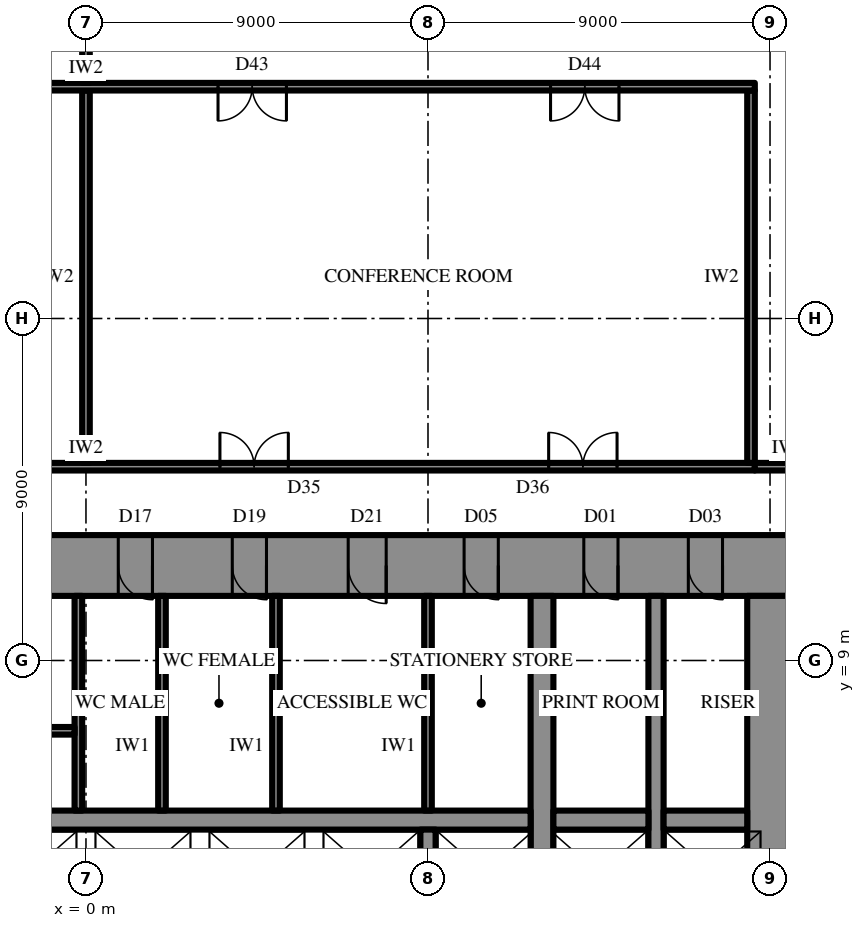
"""IFC4 building model, lengths in metres.
Left out: names, types, materials, properties, quantities, classifications, styles, units other than length and angle.
Written with IfcOpenShell. Run it as: python <this file> out.ifc"""

import sys

from ifc_helpers import new_model, si_unit, direction, frame, frame_2d, origin, place, context, subcontext, project, spatial, rectangle, extrude, element, fill, save


model = new_model("IFC4")
c1 = context("Model", 3, precision=1e-05, world=origin(), true_north=direction((0.0, 1.0)))
c2 = subcontext(c1, "Body", "Model", "MODEL_VIEW")
j1 = project(units=[si_unit("LENGTHUNIT", "METRE"), si_unit("PLANEANGLEUNIT", "RADIAN")], contexts=[c1])
p1 = place(None, origin())
s1 = spatial("IfcSite", under=j1, at=p1, CompositionType="ELEMENT")
p2 = place(p1, origin())
s2 = spatial("IfcBuilding", under=s1, at=p2, CompositionType="ELEMENT")
p3 = place(p2, frame((0.0, 0.0, 13.0)))
s3 = spatial("IfcBuildingStorey", under=s2, at=p3, CompositionType="ELEMENT", Elevation=13.0)
p4 = place(p3, frame((-18.6, 11.5, 0.0), z_axis=(0.0, 0.0, 1.0), x_axis=(1.0, 0.0, 0.0)))
e1 = element("IfcWall", 1, at=p4, inside=s3, PredefinedType="SHEAR", context=c2, shape_type="SweptSolid", body=[
    extrude(rectangle(XDim=37.2, YDim=1.6, at=frame_2d((18.6, 0.0))), origin(), (0.0, 0.0, 1.0), 5.5),
])
p5 = place(p4, frame((19.45, 0.0, 0.0)))
e2 = element("IfcOpeningElement", 2, at=p5, cuts=e1, PredefinedType="OPENING", context=c2, shape_type="SweptSolid", body=[
    extrude(rectangle(XDim=0.9, YDim=2.2, at=frame_2d((0.45, 1.1))), frame((0.0, 0.81, 0.0), z_axis=(0.0, -1.0, 0.0), x_axis=(1.0, 0.0, 0.0)), (0.0, 0.0, 1.0), 1.62),
])
p6 = place(p4, frame((22.45, 0.0, 0.0)))
e3 = element("IfcOpeningElement", 3, at=p6, cuts=e1, PredefinedType="OPENING", context=c2, shape_type="SweptSolid", body=[
    extrude(rectangle(XDim=0.9, YDim=2.2, at=frame_2d((0.45, 1.1))), frame((0.0, 0.81, 0.0), z_axis=(0.0, -1.0, 0.0), x_axis=(1.0, 0.0, 0.0)), (0.0, 0.0, 1.0), 1.62),
])
p7 = place(p4, frame((25.5, 0.0, 0.0)))
e4 = element("IfcOpeningElement", 4, at=p7, cuts=e1, PredefinedType="OPENING", context=c2, shape_type="SweptSolid", body=[
    extrude(rectangle(XDim=1.0, YDim=2.2, at=frame_2d((0.5, 1.1))), frame((0.0, 0.81, 0.0), z_axis=(0.0, -1.0, 0.0), x_axis=(1.0, 0.0, 0.0)), (0.0, 0.0, 1.0), 1.62),
])
p8 = place(p4, frame((1.85, 0.0, 0.0)))
e5 = element("IfcOpeningElement", 5, at=p8, cuts=e1, PredefinedType="OPENING", context=c2, shape_type="SweptSolid", body=[
    extrude(rectangle(XDim=0.9, YDim=2.2, at=frame_2d((0.45, 1.1))), frame((0.0, 0.81, 0.0), z_axis=(0.0, -1.0, 0.0), x_axis=(1.0, 0.0, 0.0)), (0.0, 0.0, 1.0), 1.62),
])
p9 = place(p4, frame((4.6, 0.0, 0.0)))
e6 = element("IfcOpeningElement", 6, at=p9, cuts=e1, PredefinedType="OPENING", context=c2, shape_type="SweptSolid", body=[
    extrude(rectangle(XDim=0.9, YDim=2.2, at=frame_2d((0.45, 1.1))), frame((0.0, 0.81, 0.0), z_axis=(0.0, -1.0, 0.0), x_axis=(1.0, 0.0, 0.0)), (0.0, 0.0, 1.0), 1.62),
])
p10 = place(p4, frame((7.75, 0.0, 0.0)))
e7 = element("IfcOpeningElement", 7, at=p10, cuts=e1, PredefinedType="OPENING", context=c2, shape_type="SweptSolid", body=[
    extrude(rectangle(XDim=0.9, YDim=2.2, at=frame_2d((0.45, 1.1))), frame((0.0, 0.81, 0.0), z_axis=(0.0, -1.0, 0.0), x_axis=(1.0, 0.0, 0.0)), (0.0, 0.0, 1.0), 1.62),
])
p11 = place(p4, frame((28.55, 0.0, 0.0)))
e8 = element("IfcOpeningElement", 8, at=p11, cuts=e1, PredefinedType="OPENING", context=c2, shape_type="SweptSolid", body=[
    extrude(rectangle(XDim=0.9, YDim=2.2, at=frame_2d((0.45, 1.1))), frame((0.0, 0.81, 0.0), z_axis=(0.0, -1.0, 0.0), x_axis=(1.0, 0.0, 0.0)), (0.0, 0.0, 1.0), 1.62),
])
p12 = place(p4, frame((31.7, 0.0, 0.0)))
e9 = element("IfcOpeningElement", 9, at=p12, cuts=e1, PredefinedType="OPENING", context=c2, shape_type="SweptSolid", body=[
    extrude(rectangle(XDim=0.9, YDim=2.2, at=frame_2d((0.45, 1.1))), frame((0.0, 0.81, 0.0), z_axis=(0.0, -1.0, 0.0), x_axis=(1.0, 0.0, 0.0)), (0.0, 0.0, 1.0), 1.62),
])
p13 = place(p4, frame((34.45, 0.0, 0.0)))
e10 = element("IfcOpeningElement", 10, at=p13, cuts=e1, PredefinedType="OPENING", context=c2, shape_type="SweptSolid", body=[
    extrude(rectangle(XDim=0.9, YDim=2.2, at=frame_2d((0.45, 1.1))), frame((0.0, 0.81, 0.0), z_axis=(0.0, -1.0, 0.0), x_axis=(1.0, 0.0, 0.0)), (0.0, 0.0, 1.0), 1.62),
])
p14 = place(p3, frame((18.0, -10.7, 0.0), z_axis=(0.0, 0.0, 1.0), x_axis=(0.0, 1.0, 0.0)))
e11 = element("IfcWall", 11, at=p14, inside=s3, PredefinedType="SHEAR", context=c2, shape_type="SweptSolid", body=[
    extrude(rectangle(XDim=21.4, YDim=1.2, at=frame_2d((10.7, 0.0))), origin(), (0.0, 0.0, 1.0), 5.5),
])
p15 = place(p14, frame((9.8, 0.0, 0.0)))
e12 = element("IfcOpeningElement", 12, at=p15, cuts=e11, PredefinedType="OPENING", context=c2, shape_type="SweptSolid", body=[
    extrude(rectangle(XDim=1.8, YDim=2.4, at=frame_2d((0.9, 1.2))), frame((0.0, 0.61, 0.0), z_axis=(0.0, -1.0, 0.0), x_axis=(1.0, 0.0, 0.0)), (0.0, 0.0, 1.0), 1.22),
])
p16 = place(p3, frame((12.0, -10.7, 0.0), z_axis=(0.0, 0.0, 1.0), x_axis=(0.0, 1.0, 0.0)))
e13 = element("IfcWall", 13, at=p16, inside=s3, PredefinedType="SHEAR", context=c2, shape_type="SweptSolid", body=[
    extrude(rectangle(XDim=21.4, YDim=0.6, at=frame_2d((10.7, 0.0))), origin(), (0.0, 0.0, 1.0), 5.5),
])
p17 = place(p16, frame((9.8, 0.0, 0.0)))
e14 = element("IfcOpeningElement", 14, at=p17, cuts=e13, PredefinedType="OPENING", context=c2, shape_type="SweptSolid", body=[
    extrude(rectangle(XDim=1.8, YDim=2.4, at=frame_2d((0.9, 1.2))), frame((0.0, 0.31, 0.0), z_axis=(0.0, -1.0, 0.0), x_axis=(1.0, 0.0, 0.0)), (0.0, 0.0, 1.0), 0.62),
])
p18 = place(p3, frame((15.0, -10.7, 0.0), z_axis=(0.0, 0.0, 1.0), x_axis=(0.0, 1.0, 0.0)))
e15 = element("IfcWall", 15, at=p18, inside=s3, PredefinedType="SHEAR", context=c2, shape_type="SweptSolid", body=[
    extrude(rectangle(XDim=21.4, YDim=0.4, at=frame_2d((10.7, 0.0))), origin(), (0.0, 0.0, 1.0), 5.5),
])
p19 = place(p18, frame((9.8, 0.0, 0.0)))
e16 = element("IfcOpeningElement", 16, at=p19, cuts=e15, PredefinedType="OPENING", context=c2, shape_type="SweptSolid", body=[
    extrude(rectangle(XDim=1.8, YDim=2.4, at=frame_2d((0.9, 1.2))), frame((0.0, 0.21, 0.0), z_axis=(0.0, -1.0, 0.0), x_axis=(1.0, 0.0, 0.0)), (0.0, 0.0, 1.0), 0.42),
])
p20 = place(p3, frame((-11.7, 4.8, 0.0), z_axis=(0.0, 0.0, 1.0), x_axis=(1.0, 0.0, 0.0)))
e17 = element("IfcWall", 17, at=p20, inside=s3, PredefinedType="SHEAR", context=c2, shape_type="SweptSolid", body=[
    extrude(rectangle(XDim=23.4, YDim=0.5, at=frame_2d((11.7, 0.0))), origin(), (0.0, 0.0, 1.0), 5.5),
])
p21 = place(p20, frame((6.6, 0.0, 0.0)))
e18 = element("IfcOpeningElement", 18, at=p21, cuts=e17, PredefinedType="OPENING", context=c2, shape_type="SweptSolid", body=[
    extrude(rectangle(XDim=1.2, YDim=2.2, at=frame_2d((0.6, 1.1))), frame((0.0, 0.26, 0.0), z_axis=(0.0, -1.0, 0.0), x_axis=(1.0, 0.0, 0.0)), (0.0, 0.0, 1.0), 0.52),
])
p22 = place(p20, frame((3.6, 0.0, 0.0)))
e19 = element("IfcOpeningElement", 19, at=p22, cuts=e17, PredefinedType="OPENING", context=c2, shape_type="SweptSolid", body=[
    extrude(rectangle(XDim=1.2, YDim=2.2, at=frame_2d((0.6, 1.1))), frame((0.0, 0.26, 0.0), z_axis=(0.0, -1.0, 0.0), x_axis=(1.0, 0.0, 0.0)), (0.0, 0.0, 1.0), 0.52),
])
p23 = place(p3, frame((12.3, 4.8, 0.0), z_axis=(0.0, 0.0, 1.0), x_axis=(1.0, 0.0, 0.0)))
e20 = element("IfcWall", 20, at=p23, inside=s3, PredefinedType="SHEAR", context=c2, shape_type="SweptSolid", body=[
    extrude(rectangle(XDim=2.5, YDim=0.5, at=frame_2d((1.25, 0.0))), origin(), (0.0, 0.0, 1.0), 5.5),
])
p24 = place(p3, frame((15.2, 4.8, 0.0), z_axis=(0.0, 0.0, 1.0), x_axis=(1.0, 0.0, 0.0)))
e21 = element("IfcWall", 21, at=p24, inside=s3, PredefinedType="SHEAR", context=c2, shape_type="SweptSolid", body=[
    extrude(rectangle(XDim=2.2, YDim=0.5, at=frame_2d((1.1, 0.0))), origin(), (0.0, 0.0, 1.0), 5.5),
])
p25 = place(p3, frame((9.0, 2.25, 0.0), z_axis=(0.0, 0.0, 1.0), x_axis=(0.0, 1.0, 0.0)))
e22 = element("IfcWall", 22, at=p25, inside=s3, PredefinedType="SHEAR", context=c2, shape_type="SweptSolid", body=[
    extrude(rectangle(XDim=2.3, YDim=0.4, at=frame_2d((1.15, 0.0))), origin(), (0.0, 0.0, 1.0), 5.5),
])
p26 = place(p3, frame((-0.2, 5.05, 0.0), z_axis=(0.0, 0.0, 1.0), x_axis=(0.0, 1.0, 0.0)))
e23 = element("IfcWall", 23, at=p26, inside=s3, PredefinedType="SHEAR", context=c2, shape_type="SweptSolid", body=[
    extrude(rectangle(XDim=5.65, YDim=0.2, at=frame_2d((2.825, 0.0))), origin(), (0.0, 0.0, 1.0), 5.5),
])
p27 = place(p3, frame((-8.9, 7.15, 0.0), z_axis=(0.0, 0.0, 1.0), x_axis=(1.0, 0.0, 0.0)))
e24 = element("IfcWall", 24, at=p27, inside=s3, PredefinedType="SHEAR", context=c2, shape_type="SweptSolid", body=[
    extrude(rectangle(XDim=8.6, YDim=0.2, at=frame_2d((4.3, 0.0))), origin(), (0.0, 0.0, 1.0), 5.5),
])
p28 = place(p27, frame((0.3, 0.0, 0.0)))
e25 = element("IfcOpeningElement", 25, at=p28, cuts=e24, PredefinedType="OPENING", context=c2, shape_type="SweptSolid", body=[
    extrude(rectangle(XDim=1.0, YDim=2.2, at=frame_2d((0.5, 1.1))), frame((0.0, 0.11, 0.0), z_axis=(0.0, -1.0, 0.0), x_axis=(1.0, 0.0, 0.0)), (0.0, 0.0, 1.0), 0.22),
])
for number, where, z_axis, x_axis in (
    (26, (9.0, 5.05, 0.0), (0.0, 0.0, 1.0), (0.0, 1.0, 0.0)),
    (27, (2.0, 5.05, 0.0), (0.0, 0.0, 1.0), (0.0, 1.0, 0.0)),
    (28, (5.0, 5.05, 0.0), (0.0, 0.0, 1.0), (0.0, 1.0, 0.0)),
):
    element("IfcWall", number, at=place(p3, frame(where, z_axis=z_axis, x_axis=x_axis)), inside=s3, PredefinedType="PARTITIONING", context=c2, shape_type="SweptSolid", body=[
        extrude(rectangle(XDim=5.65, YDim=0.2, at=frame_2d((2.825, 0.0))), origin(), (0.0, 0.0, 1.0), 5.15),
    ])
p29 = place(p3, frame((-17.6, 14.1, 0.0), z_axis=(0.0, 0.0, 1.0), x_axis=(1.0, 0.0, 0.0)))
e29 = element("IfcWall", 29, at=p29, inside=s3, PredefinedType="PARTITIONING", context=c2, shape_type="SweptSolid", body=[
    extrude(rectangle(XDim=35.2, YDim=0.2, at=frame_2d((17.6, 0.0))), origin(), (0.0, 0.0, 1.0), 5.15),
])
p30 = place(p29, frame((3.625, 0.0, 0.0)))
e30 = element("IfcOpeningElement", 30, at=p30, cuts=e29, PredefinedType="OPENING", context=c2, shape_type="SweptSolid", body=[
    extrude(rectangle(XDim=1.8, YDim=2.4, at=frame_2d((0.9, 1.2))), frame((0.0, 0.11, 0.0), z_axis=(0.0, -1.0, 0.0), x_axis=(1.0, 0.0, 0.0)), (0.0, 0.0, 1.0), 0.22),
])
p31 = place(p29, frame((12.275, 0.0, 0.0)))
e31 = element("IfcOpeningElement", 31, at=p31, cuts=e29, PredefinedType="OPENING", context=c2, shape_type="SweptSolid", body=[
    extrude(rectangle(XDim=1.8, YDim=2.4, at=frame_2d((0.9, 1.2))), frame((0.0, 0.11, 0.0), z_axis=(0.0, -1.0, 0.0), x_axis=(1.0, 0.0, 0.0)), (0.0, 0.0, 1.0), 0.22),
])
p32 = place(p29, frame((21.125, 0.0, 0.0)))
e32 = element("IfcOpeningElement", 32, at=p32, cuts=e29, PredefinedType="OPENING", context=c2, shape_type="SweptSolid", body=[
    extrude(rectangle(XDim=1.8, YDim=2.4, at=frame_2d((0.9, 1.2))), frame((0.0, 0.11, 0.0), z_axis=(0.0, -1.0, 0.0), x_axis=(1.0, 0.0, 0.0)), (0.0, 0.0, 1.0), 0.22),
])
p33 = place(p29, frame((29.775, 0.0, 0.0)))
e33 = element("IfcOpeningElement", 33, at=p33, cuts=e29, PredefinedType="OPENING", context=c2, shape_type="SweptSolid", body=[
    extrude(rectangle(XDim=1.8, YDim=2.4, at=frame_2d((0.9, 1.2))), frame((0.0, 0.11, 0.0), z_axis=(0.0, -1.0, 0.0), x_axis=(1.0, 0.0, 0.0)), (0.0, 0.0, 1.0), 0.22),
])
p34 = place(p3, frame((0.0, 14.2, 0.0), z_axis=(0.0, 0.0, 1.0), x_axis=(0.0, 1.0, 0.0)))
e34 = element("IfcWall", 34, at=p34, inside=s3, PredefinedType="PARTITIONING", context=c2, shape_type="SweptSolid", body=[
    extrude(rectangle(XDim=9.8, YDim=0.2, at=frame_2d((4.9, 0.0))), origin(), (0.0, 0.0, 1.0), 4.094),
])
p35 = place(p3, frame((17.5, 14.2, 0.0), z_axis=(0.0, 0.0, 1.0), x_axis=(0.0, 1.0, 0.0)))
e35 = element("IfcWall", 35, at=p35, inside=s3, PredefinedType="PARTITIONING", context=c2, shape_type="SweptSolid", body=[
    extrude(rectangle(XDim=9.8, YDim=0.2, at=frame_2d((4.9, 0.0))), origin(), (0.0, 0.0, 1.0), 5.15),
])
p36 = place(p3, frame((-17.6, 24.1, 0.0), z_axis=(0.0, 0.0, 1.0), x_axis=(1.0, 0.0, 0.0)))
e36 = element("IfcWall", 36, at=p36, inside=s3, PredefinedType="PARTITIONING", context=c2, shape_type="SweptSolid", body=[
    extrude(rectangle(XDim=35.2, YDim=0.2, at=frame_2d((17.6, 0.0))), origin(), (0.0, 0.0, 1.0), 5.15),
])
p37 = place(p36, frame((3.575, 0.0, 0.0)))
e37 = element("IfcOpeningElement", 37, at=p37, cuts=e36, PredefinedType="OPENING", context=c2, shape_type="SweptSolid", body=[
    extrude(rectangle(XDim=1.8, YDim=2.4, at=frame_2d((0.9, 1.2))), frame((0.0, 0.11, 0.0), z_axis=(0.0, -1.0, 0.0), x_axis=(1.0, 0.0, 0.0)), (0.0, 0.0, 1.0), 0.22),
])
p38 = place(p36, frame((12.325, 0.0, 0.0)))
e38 = element("IfcOpeningElement", 38, at=p38, cuts=e36, PredefinedType="OPENING", context=c2, shape_type="SweptSolid", body=[
    extrude(rectangle(XDim=1.8, YDim=2.4, at=frame_2d((0.9, 1.2))), frame((0.0, 0.11, 0.0), z_axis=(0.0, -1.0, 0.0), x_axis=(1.0, 0.0, 0.0)), (0.0, 0.0, 1.0), 0.22),
])
p39 = place(p36, frame((21.075, 0.0, 0.0)))
e39 = element("IfcOpeningElement", 39, at=p39, cuts=e36, PredefinedType="OPENING", context=c2, shape_type="SweptSolid", body=[
    extrude(rectangle(XDim=1.8, YDim=2.4, at=frame_2d((0.9, 1.2))), frame((0.0, 0.11, 0.0), z_axis=(0.0, -1.0, 0.0), x_axis=(1.0, 0.0, 0.0)), (0.0, 0.0, 1.0), 0.22),
])
p40 = place(p36, frame((29.825, 0.0, 0.0)))
e40 = element("IfcOpeningElement", 40, at=p40, cuts=e36, PredefinedType="OPENING", context=c2, shape_type="SweptSolid", body=[
    extrude(rectangle(XDim=1.8, YDim=2.4, at=frame_2d((0.9, 1.2))), frame((0.0, 0.11, 0.0), z_axis=(0.0, -1.0, 0.0), x_axis=(1.0, 0.0, 0.0)), (0.0, 0.0, 1.0), 0.22),
])
p41 = place(p3, frame((17.6, 14.1, 0.0), z_axis=(0.0, 0.0, 1.0), x_axis=(1.0, 0.0, 0.0)))
e41 = element("IfcWall", 41, at=p41, inside=s3, PredefinedType="PARTITIONING", context=c2, shape_type="SweptSolid", body=[
    extrude(rectangle(XDim=1.8, YDim=0.2, at=frame_2d((0.9, 0.0))), origin(), (0.0, 0.0, 1.0), 5.15),
])
p42 = place(p3, frame((0.0, 24.2, 0.0), z_axis=(0.0, 0.0, 1.0), x_axis=(0.0, 1.0, 0.0)))
e42 = element("IfcWall", 42, at=p42, inside=s3, PredefinedType="PARTITIONING", context=c2, shape_type="SweptSolid", body=[
    extrude(rectangle(XDim=9.52, YDim=0.2, at=frame_2d((4.76, 0.0))), origin(), (0.0, 0.0, 1.0), 4.094),
])
p43 = place(p5, frame((0.9, 0.0, 0.0), z_axis=(0.0, 0.0, 1.0), x_axis=(-1.0, 0.0, 0.0)))
e43 = element("IfcDoor", 43, at=p43, inside=s3, OperationType="SINGLE_SWING_RIGHT", PredefinedType="DOOR", context=c2, shape_type="SweptSolid", body=[
    extrude(rectangle(XDim=0.9, YDim=2.2, at=frame_2d((0.45, 1.1))), frame((0.0, 0.025, 0.0), z_axis=(0.0, -1.0, 0.0), x_axis=(1.0, 0.0, 0.0)), (0.0, 0.0, 1.0), 0.05),
])
fill(e2, e43)
p44 = place(p6, frame((0.9, 0.0, 0.0), z_axis=(0.0, 0.0, 1.0), x_axis=(-1.0, 0.0, 0.0)))
e44 = element("IfcDoor", 44, at=p44, inside=s3, OperationType="SINGLE_SWING_RIGHT", PredefinedType="DOOR", context=c2, shape_type="SweptSolid", body=[
    extrude(rectangle(XDim=0.9, YDim=2.2, at=frame_2d((0.45, 1.1))), frame((0.0, 0.025, 0.0), z_axis=(0.0, -1.0, 0.0), x_axis=(1.0, 0.0, 0.0)), (0.0, 0.0, 1.0), 0.05),
])
fill(e3, e44)
p45 = place(p7, frame((1.0, 0.0, 0.0), z_axis=(0.0, 0.0, 1.0), x_axis=(-1.0, 0.0, 0.0)))
e45 = element("IfcDoor", 45, at=p45, inside=s3, OperationType="SINGLE_SWING_RIGHT", PredefinedType="DOOR", context=c2, shape_type="SweptSolid", body=[
    extrude(rectangle(XDim=1.0, YDim=2.2, at=frame_2d((0.5, 1.1))), frame((0.0, 0.025, 0.0), z_axis=(0.0, -1.0, 0.0), x_axis=(1.0, 0.0, 0.0)), (0.0, 0.0, 1.0), 0.05),
])
fill(e4, e45)
p46 = place(p11, frame((0.9, 0.0, 0.0), z_axis=(0.0, 0.0, 1.0), x_axis=(-1.0, 0.0, 0.0)))
e46 = element("IfcDoor", 46, at=p46, inside=s3, OperationType="SINGLE_SWING_RIGHT", PredefinedType="DOOR", context=c2, shape_type="SweptSolid", body=[
    extrude(rectangle(XDim=0.9, YDim=2.2, at=frame_2d((0.45, 1.1))), frame((0.0, 0.025, 0.0), z_axis=(0.0, -1.0, 0.0), x_axis=(1.0, 0.0, 0.0)), (0.0, 0.0, 1.0), 0.05),
])
fill(e8, e46)
p47 = place(p12, frame((0.9, 0.0, 0.0), z_axis=(0.0, 0.0, 1.0), x_axis=(-1.0, 0.0, 0.0)))
e47 = element("IfcDoor", 47, at=p47, inside=s3, OperationType="SINGLE_SWING_RIGHT", PredefinedType="DOOR", context=c2, shape_type="SweptSolid", body=[
    extrude(rectangle(XDim=0.9, YDim=2.2, at=frame_2d((0.45, 1.1))), frame((0.0, 0.025, 0.0), z_axis=(0.0, -1.0, 0.0), x_axis=(1.0, 0.0, 0.0)), (0.0, 0.0, 1.0), 0.05),
])
fill(e9, e47)
p48 = place(p13, frame((0.9, 0.0, 0.0), z_axis=(0.0, 0.0, 1.0), x_axis=(-1.0, 0.0, 0.0)))
e48 = element("IfcDoor", 48, at=p48, inside=s3, OperationType="SINGLE_SWING_RIGHT", PredefinedType="DOOR", context=c2, shape_type="SweptSolid", body=[
    extrude(rectangle(XDim=0.9, YDim=2.2, at=frame_2d((0.45, 1.1))), frame((0.0, 0.025, 0.0), z_axis=(0.0, -1.0, 0.0), x_axis=(1.0, 0.0, 0.0)), (0.0, 0.0, 1.0), 0.05),
])
fill(e10, e48)
p49 = place(p39, frame((1.8, 0.0, 0.0), z_axis=(0.0, 0.0, 1.0), x_axis=(-1.0, 0.0, 0.0)))
e49 = element("IfcDoor", 49, at=p49, inside=s3, OperationType="DOUBLE_DOOR_SINGLE_SWING", PredefinedType="DOOR", context=c2, shape_type="SweptSolid", body=[
    extrude(rectangle(XDim=1.8, YDim=2.4, at=frame_2d((0.9, 1.2))), frame((0.0, 0.025, 0.0), z_axis=(0.0, -1.0, 0.0), x_axis=(1.0, 0.0, 0.0)), (0.0, 0.0, 1.0), 0.05),
])
fill(e39, e49)
p50 = place(p40, frame((1.8, 0.0, 0.0), z_axis=(0.0, 0.0, 1.0), x_axis=(-1.0, 0.0, 0.0)))
e50 = element("IfcDoor", 50, at=p50, inside=s3, OperationType="DOUBLE_DOOR_SINGLE_SWING", PredefinedType="DOOR", context=c2, shape_type="SweptSolid", body=[
    extrude(rectangle(XDim=1.8, YDim=2.4, at=frame_2d((0.9, 1.2))), frame((0.0, 0.025, 0.0), z_axis=(0.0, -1.0, 0.0), x_axis=(1.0, 0.0, 0.0)), (0.0, 0.0, 1.0), 0.05),
])
fill(e40, e50)
p51 = place(p32, origin())
e51 = element("IfcDoor", 51, at=p51, inside=s3, OperationType="DOUBLE_DOOR_SINGLE_SWING", PredefinedType="DOOR", context=c2, shape_type="SweptSolid", body=[
    extrude(rectangle(XDim=1.8, YDim=2.4, at=frame_2d((0.9, 1.2))), frame((0.0, 0.025, 0.0), z_axis=(0.0, -1.0, 0.0), x_axis=(1.0, 0.0, 0.0)), (0.0, 0.0, 1.0), 0.05),
])
fill(e32, e51)
p52 = place(p33, origin())
e52 = element("IfcDoor", 52, at=p52, inside=s3, OperationType="DOUBLE_DOOR_SINGLE_SWING", PredefinedType="DOOR", context=c2, shape_type="SweptSolid", body=[
    extrude(rectangle(XDim=1.8, YDim=2.4, at=frame_2d((0.9, 1.2))), frame((0.0, 0.025, 0.0), z_axis=(0.0, -1.0, 0.0), x_axis=(1.0, 0.0, 0.0)), (0.0, 0.0, 1.0), 0.05),
])
fill(e33, e52)
save(model, sys.argv[1])
